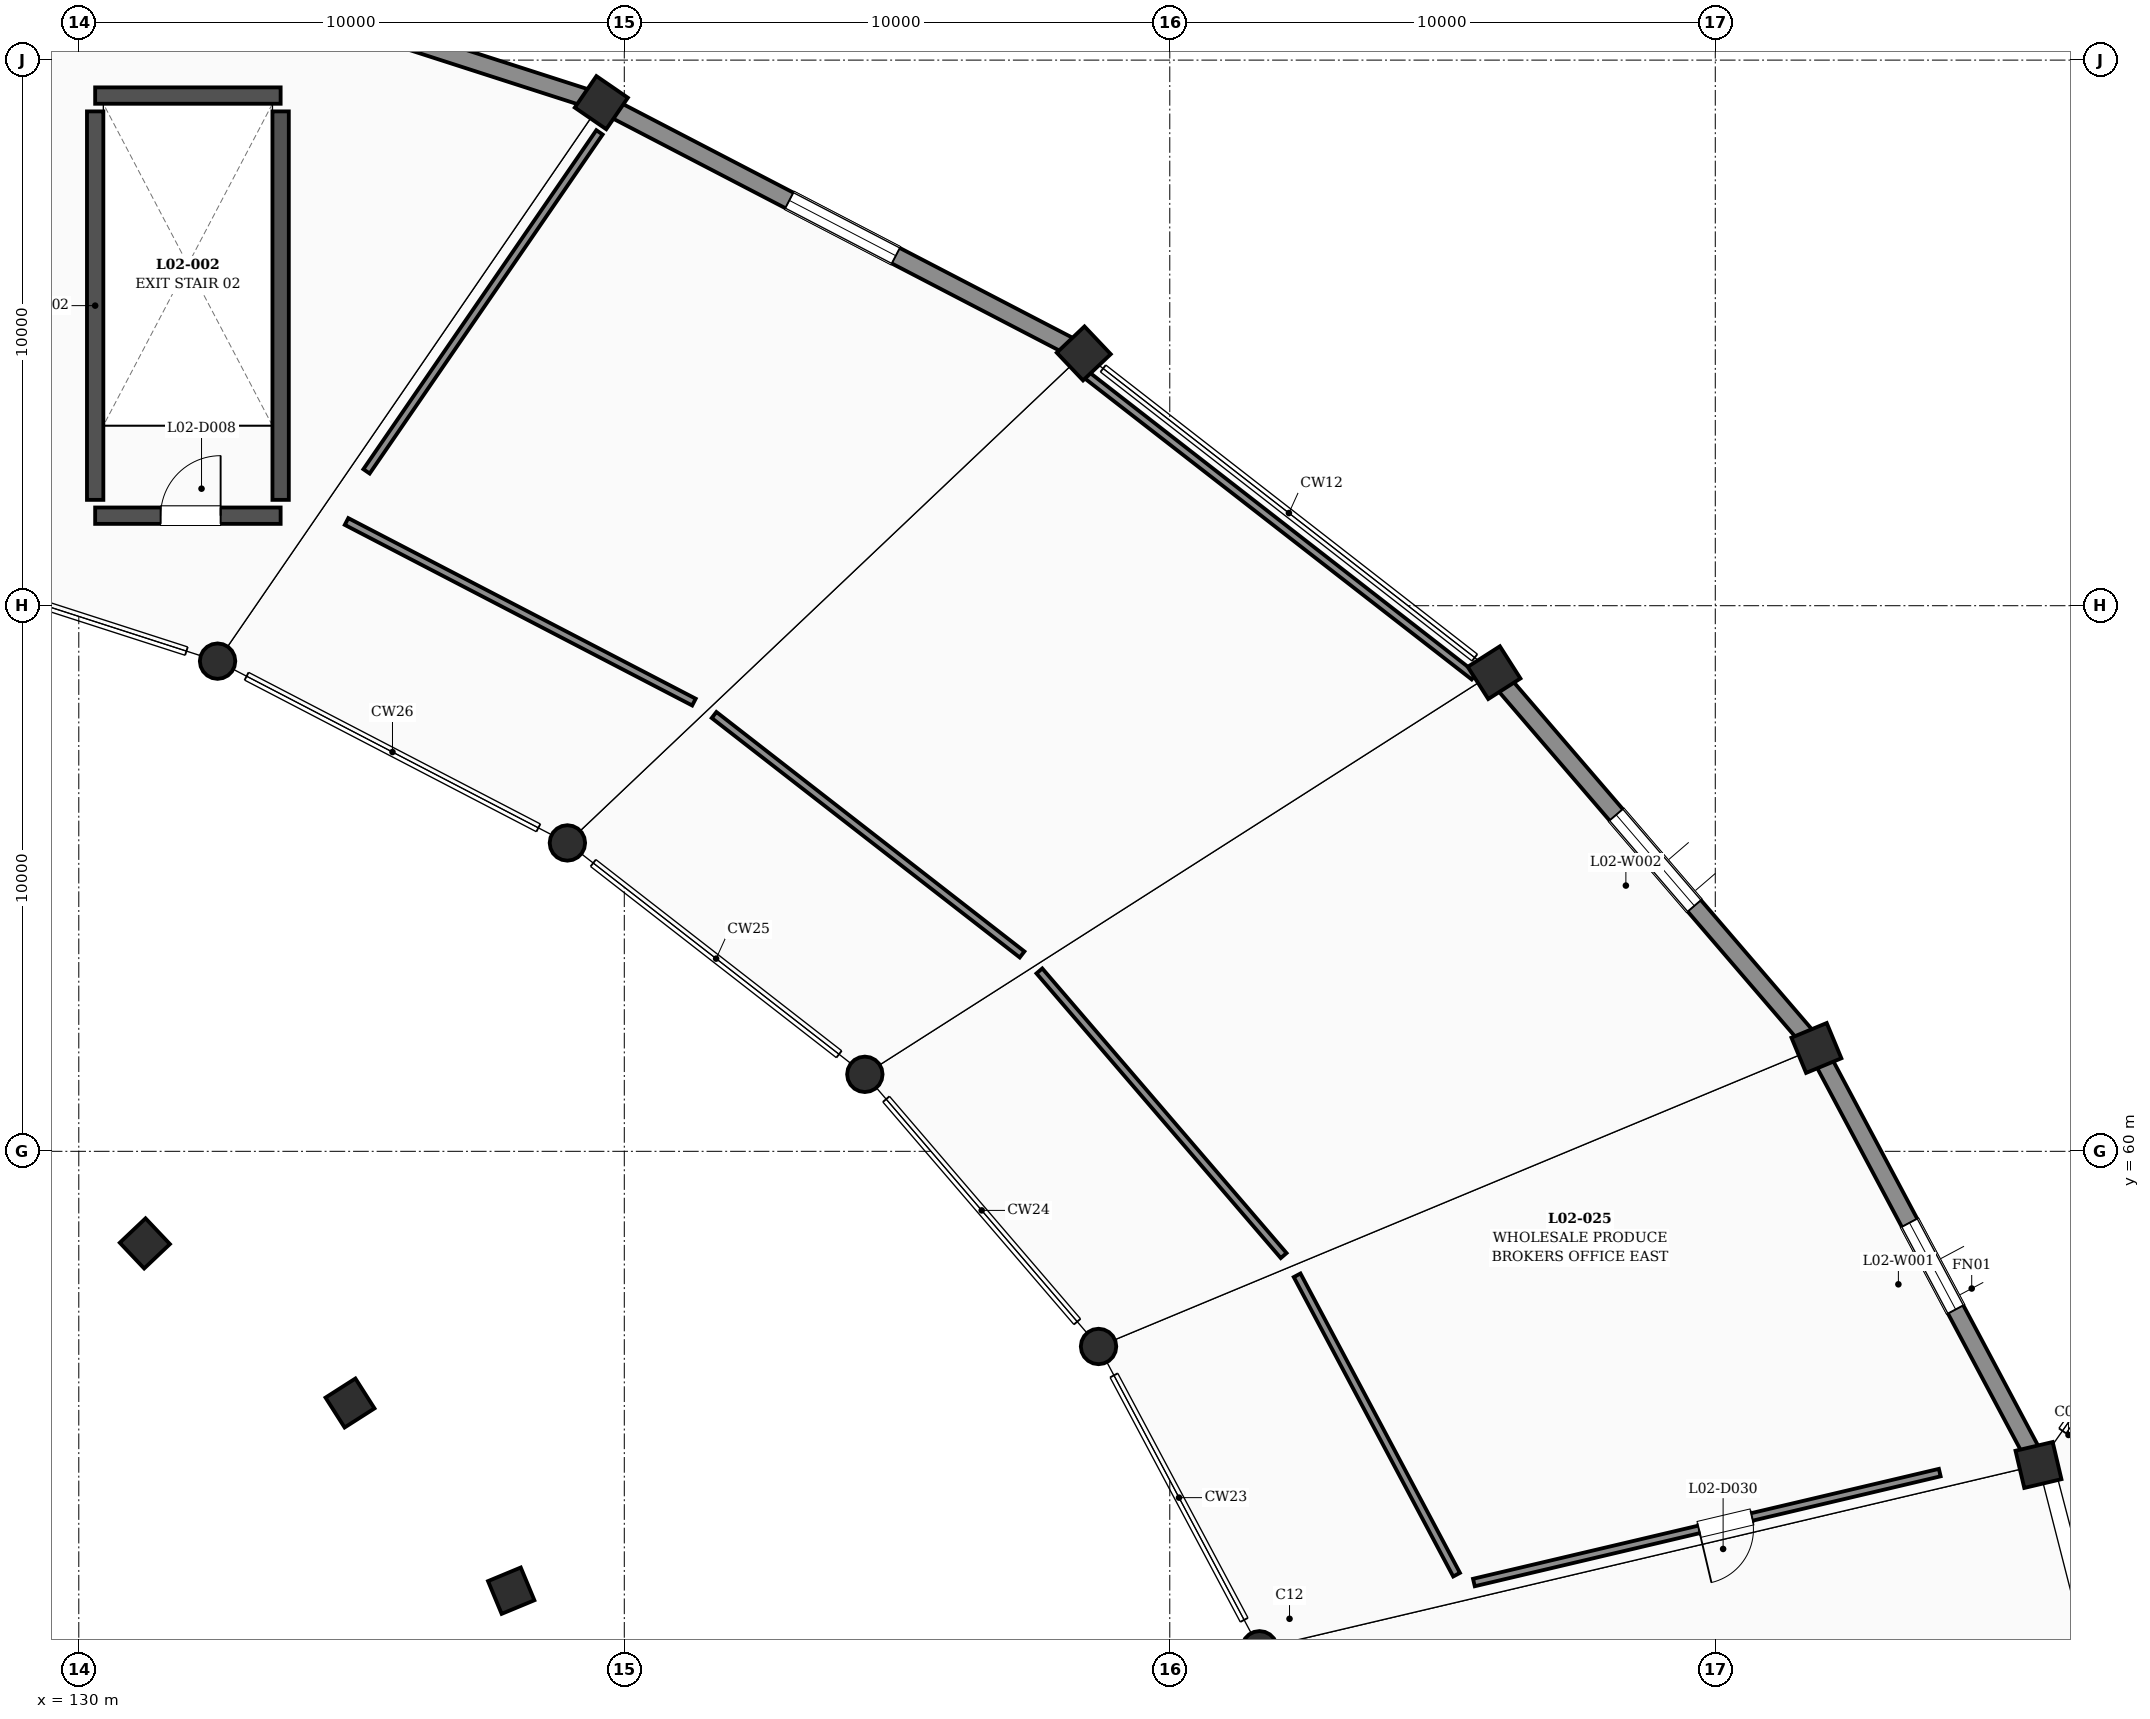
"""IFC4 building model, lengths in metres.
Left out: names, types, materials, properties, quantities, classifications, styles, units other than length and angle.
Written with IfcOpenShell. Run it as: python <this file> out.ifc"""

import sys

from ifc_helpers import new_model, si_unit, direction, frame, frame_2d, origin, origin_2d, place, context, subcontext, project, spatial, rectangle, circle, extrude, element, fill, save


model = new_model("IFC4")
c1 = context("Model", 3, precision=1e-05, world=origin(), true_north=direction((0.0, 1.0)))
c2 = subcontext(c1, "Body", "Model", "MODEL_VIEW")
j1 = project(units=[si_unit("LENGTHUNIT", "METRE"), si_unit("PLANEANGLEUNIT", "RADIAN")], contexts=[c1])
p1 = place(None, origin())
s1 = spatial("IfcSite", under=j1, at=p1, CompositionType="ELEMENT")
p2 = place(p1, origin())
s2 = spatial("IfcBuilding", under=s1, at=p2, CompositionType="ELEMENT")
p3 = place(p2, frame((0.0, 0.0, 10.8)))
s3 = spatial("IfcBuildingStorey", under=s2, at=p3, CompositionType="ELEMENT", Elevation=10.8)
p4 = place(p3, frame((165.925, 54.251, 0.0), z_axis=(0.0, 0.0, 1.0), x_axis=(-0.229710019669, 0.973259115993, 0.0)))
e1 = element("IfcColumn", 1, at=p4, inside=s3, PredefinedType="COLUMN", context=c2, shape_type="SweptSolid", body=[
    extrude(rectangle(XDim=0.7, YDim=0.7, at=origin_2d()), origin(), (0.0, 0.0, 1.0), 4.2),
])
p5 = place(p3, frame((151.645, 50.882, 0.0), z_axis=(0.0, 0.0, 1.0), x_axis=(1.0, 0.0, 0.0)))
e2 = element("IfcColumn", 2, at=p5, inside=s3, PredefinedType="COLUMN", context=c2, shape_type="SweptSolid", body=[
    extrude(circle(Radius=0.325, at=origin_2d()), origin(), (0.0, 0.0, 1.0), 4.2),
])
p6 = place(p3, frame((161.854, 61.894, 0.0), z_axis=(0.0, 0.0, 1.0), x_axis=(-0.383811878264, 0.923411307113, 0.0)))
e3 = element("IfcColumn", 3, at=p6, inside=s3, PredefinedType="COLUMN", context=c2, shape_type="SweptSolid", body=[
    extrude(rectangle(XDim=0.7, YDim=0.7, at=origin_2d()), origin(), (0.0, 0.0, 1.0), 4.2),
])
p7 = place(p3, frame((148.694, 56.423, 0.0), z_axis=(0.0, 0.0, 1.0), x_axis=(1.0, 0.0, 0.0)))
e4 = element("IfcColumn", 4, at=p7, inside=s3, PredefinedType="COLUMN", context=c2, shape_type="SweptSolid", body=[
    extrude(circle(Radius=0.325, at=origin_2d()), origin(), (0.0, 0.0, 1.0), 4.2),
])
p8 = place(p3, frame((137.927, 51.947, 0.0), z_axis=(0.0, 0.0, 1.0), x_axis=(-0.383811878264, 0.923411307113, 0.0)))
e5 = element("IfcColumn", 5, at=p8, inside=s3, PredefinedType="COLUMN", context=c2, shape_type="SweptSolid", body=[
    extrude(rectangle(XDim=0.65, YDim=0.65, at=origin_2d()), origin(), (0.0, 0.0, 1.0), 4.2),
])
p9 = place(p3, frame((155.945, 68.773, 0.0), z_axis=(0.0, 0.0, 1.0), x_axis=(-0.538035401546, 0.842922242371, 0.0)))
e6 = element("IfcColumn", 6, at=p9, inside=s3, PredefinedType="COLUMN", context=c2, shape_type="SweptSolid", body=[
    extrude(rectangle(XDim=0.7, YDim=0.7, at=origin_2d()), origin(), (0.0, 0.0, 1.0), 4.2),
])
p10 = place(p3, frame((144.41, 61.411, 0.0), z_axis=(0.0, 0.0, 1.0), x_axis=(1.0, 0.0, 0.0)))
e7 = element("IfcColumn", 7, at=p10, inside=s3, PredefinedType="COLUMN", context=c2, shape_type="SweptSolid", body=[
    extrude(circle(Radius=0.325, at=origin_2d()), origin(), (0.0, 0.0, 1.0), 4.2),
])
p11 = place(p3, frame((134.972, 55.387, 0.0), z_axis=(0.0, 0.0, 1.0), x_axis=(-0.538035401546, 0.842922242371, 0.0)))
e8 = element("IfcColumn", 8, at=p11, inside=s3, PredefinedType="COLUMN", context=c2, shape_type="SweptSolid", body=[
    extrude(rectangle(XDim=0.65, YDim=0.65, at=origin_2d()), origin(), (0.0, 0.0, 1.0), 4.2),
])
p12 = place(p3, frame((148.423, 74.624, 0.0), z_axis=(0.0, 0.0, 1.0), x_axis=(-0.687848001144, 0.725854756355, 0.0)))
e9 = element("IfcColumn", 9, at=p12, inside=s3, PredefinedType="COLUMN", context=c2, shape_type="SweptSolid", body=[
    extrude(rectangle(XDim=0.7, YDim=0.7, at=origin_2d()), origin(), (0.0, 0.0, 1.0), 4.2),
])
p13 = place(p3, frame((138.957, 65.652, 0.0), z_axis=(0.0, 0.0, 1.0), x_axis=(1.0, 0.0, 0.0)))
e10 = element("IfcColumn", 10, at=p13, inside=s3, PredefinedType="COLUMN", context=c2, shape_type="SweptSolid", body=[
    extrude(circle(Radius=0.325, at=origin_2d()), origin(), (0.0, 0.0, 1.0), 4.2),
])
p14 = place(p3, frame((131.211, 58.312, 0.0), z_axis=(0.0, 0.0, 1.0), x_axis=(-0.687848001144, 0.725854756355, 0.0)))
e11 = element("IfcColumn", 11, at=p14, inside=s3, PredefinedType="COLUMN", context=c2, shape_type="SweptSolid", body=[
    extrude(rectangle(XDim=0.65, YDim=0.65, at=origin_2d()), origin(), (0.0, 0.0, 1.0), 4.2),
])
p15 = place(p3, frame((139.579, 79.22, 0.0), z_axis=(0.0, 0.0, 1.0), x_axis=(-0.824126188622, 0.566406236925, 0.0)))
e12 = element("IfcColumn", 12, at=p15, inside=s3, PredefinedType="COLUMN", context=c2, shape_type="SweptSolid", body=[
    extrude(rectangle(XDim=0.7, YDim=0.7, at=origin_2d()), origin(), (0.0, 0.0, 1.0), 4.2),
])
p16 = place(p3, frame((132.544, 68.984, 0.0), z_axis=(0.0, 0.0, 1.0), x_axis=(1.0, 0.0, 0.0)))
e13 = element("IfcColumn", 13, at=p16, inside=s3, PredefinedType="COLUMN", context=c2, shape_type="SweptSolid", body=[
    extrude(circle(Radius=0.325, at=origin_2d()), origin(), (0.0, 0.0, 1.0), 4.2),
])
p17 = place(p3, frame((165.798, 54.489, 0.0), z_axis=(0.0, 0.0, 1.0), x_axis=(-0.47010905891, 0.882608334841, 0.0)))
e14 = element("IfcWall", 14, at=p17, inside=s3, PredefinedType="SOLIDWALL", context=c2, shape_type="SweptSolid", body=[
    extrude(rectangle(XDim=8.12, YDim=0.32, at=frame_2d((4.06, 0.0))), origin(), (0.0, 0.0, 1.0), 2.55),
])
p18 = place(p17, frame((2.96, 0.0, 0.55)))
e15 = element("IfcOpeningElement", 15, at=p18, cuts=e14, PredefinedType="OPENING", context=c2, shape_type="SweptSolid", body=[
    extrude(rectangle(XDim=1.8, YDim=1.8, at=frame_2d((0.9, 0.9))), frame((0.0, 0.17, 0.0), z_axis=(0.0, -1.0, 0.0), x_axis=(1.0, 0.0, 0.0)), (0.0, 0.0, 1.0), 0.34),
])
p19 = place(p3, frame((161.678, 62.099, 0.0), z_axis=(0.0, 0.0, 1.0), x_axis=(-0.651606697641, 0.758556992974, 0.0)))
e16 = element("IfcWall", 16, at=p19, inside=s3, PredefinedType="SOLIDWALL", context=c2, shape_type="SweptSolid", body=[
    extrude(rectangle(XDim=8.528, YDim=0.32, at=frame_2d((4.264, 0.0))), origin(), (0.0, 0.0, 1.0), 2.55),
])
p20 = place(p19, frame((3.164, 0.0, 0.55)))
e17 = element("IfcOpeningElement", 17, at=p20, cuts=e16, PredefinedType="OPENING", context=c2, shape_type="SweptSolid", body=[
    extrude(rectangle(XDim=2.2, YDim=1.8, at=frame_2d((1.1, 0.9))), frame((0.0, 0.17, 0.0), z_axis=(0.0, -1.0, 0.0), x_axis=(1.0, 0.0, 0.0)), (0.0, 0.0, 1.0), 0.34),
])
p21 = place(p3, frame((148.183, 74.749, 0.0), z_axis=(0.0, 0.0, 1.0), x_axis=(-0.887335924519, 0.461123581112, 0.0)))
e18 = element("IfcWall", 18, at=p21, inside=s3, PredefinedType="SOLIDWALL", context=c2, shape_type="SweptSolid", body=[
    extrude(rectangle(XDim=9.427, YDim=0.32, at=frame_2d((4.713, 0.0))), origin(), (0.0, 0.0, 1.0), 2.55),
])
p22 = place(p21, frame((3.613, 0.0, 0.55)))
e19 = element("IfcOpeningElement", 19, at=p22, cuts=e18, PredefinedType="OPENING", context=c2, shape_type="SweptSolid", body=[
    extrude(rectangle(XDim=2.2, YDim=1.8, at=frame_2d((1.1, 0.9))), frame((0.0, 0.17, 0.0), z_axis=(0.0, -1.0, 0.0), x_axis=(1.0, 0.0, 0.0)), (0.0, 0.0, 1.0), 0.34),
])
p23 = place(p3, frame((139.322, 79.303, 0.0), z_axis=(0.0, 0.0, 1.0), x_axis=(-0.95182847269, 0.30663098111, 0.0)))
e20 = element("IfcWall", 20, at=p23, inside=s3, PredefinedType="SOLIDWALL", context=c2, shape_type="SweptSolid", body=[
    extrude(rectangle(XDim=9.785, YDim=0.32, at=frame_2d((4.893, 0.0))), origin(), (0.0, 0.0, 1.0), 2.55),
])
p24 = place(p23, frame((3.793, 0.0, 0.55)))
e21 = element("IfcOpeningElement", 21, at=p24, cuts=e20, PredefinedType="OPENING", context=c2, shape_type="SweptSolid", body=[
    extrude(rectangle(XDim=1.8, YDim=1.8, at=frame_2d((0.9, 0.9))), frame((0.0, 0.17, 0.0), z_axis=(0.0, -1.0, 0.0), x_axis=(1.0, 0.0, 0.0)), (0.0, 0.0, 1.0), 0.34),
])
p25 = place(p3, frame((130.3, 71.65, 0.0), z_axis=(0.0, 0.0, 1.0), x_axis=(1.0, 0.0, 0.0)))
e22 = element("IfcWall", 22, at=p25, inside=s3, PredefinedType="SHEAR", context=c2, shape_type="SweptSolid", body=[
    extrude(rectangle(XDim=3.4, YDim=0.3, at=frame_2d((1.7, 0.0))), origin(), (0.0, 0.0, 1.0), 3.98),
])
p26 = place(p25, frame((1.2, 0.0, 0.0)))
e23 = element("IfcOpeningElement", 23, at=p26, cuts=e22, PredefinedType="OPENING", context=c2, shape_type="SweptSolid", body=[
    extrude(rectangle(XDim=1.1, YDim=2.2, at=frame_2d((0.55, 1.1))), frame((0.0, 0.16, 0.0), z_axis=(0.0, -1.0, 0.0), x_axis=(1.0, 0.0, 0.0)), (0.0, 0.0, 1.0), 0.32),
])
p27 = place(p3, frame((130.3, 79.35, 0.0), z_axis=(0.0, 0.0, 1.0), x_axis=(1.0, 0.0, 0.0)))
e24 = element("IfcWall", 24, at=p27, inside=s3, PredefinedType="SHEAR", context=c2, shape_type="SweptSolid", body=[
    extrude(rectangle(XDim=3.4, YDim=0.3, at=frame_2d((1.7, 0.0))), origin(), (0.0, 0.0, 1.0), 3.98),
])
for number, where, z_axis, x_axis in (
    (25, (130.3, 71.94, 0.0), (0.0, 0.0, 1.0), (0.0, 1.0, 0.0)),
    (26, (133.7, 71.94, 0.0), (0.0, 0.0, 1.0), (0.0, 1.0, 0.0)),
):
    element("IfcWall", number, at=place(p3, frame(where, z_axis=z_axis, x_axis=x_axis)), inside=s3, PredefinedType="SHEAR", context=c2, shape_type="SweptSolid", body=[
        extrude(rectangle(XDim=7.12, YDim=0.3, at=frame_2d((3.56, 0.0))), origin(), (0.0, 0.0, 1.0), 3.98),
    ])
p28 = place(p3, frame((152.088, 58.089, 0.0), z_axis=(0.0, 0.0, 1.0), x_axis=(-0.651320491165, 0.758802752887, 0.0)))
e27 = element("IfcWall", 27, at=p28, inside=s3, PredefinedType="PARTITIONING", context=c2, shape_type="SweptSolid", body=[
    extrude(rectangle(XDim=6.876, YDim=0.14, at=frame_2d((3.438, 0.0))), origin(), (0.0, 0.0, 1.0), 2.55),
])
p29 = place(p3, frame((147.292, 63.608, 0.0), z_axis=(0.0, 0.0, 1.0), x_axis=(-0.789524972824, 0.61371843486, 0.0)))
e28 = element("IfcWall", 28, at=p29, inside=s3, PredefinedType="PARTITIONING", context=c2, shape_type="SweptSolid", body=[
    extrude(rectangle(XDim=7.152, YDim=0.14, at=frame_2d((3.576, 0.0))), origin(), (0.0, 0.0, 1.0), 2.55),
])
p30 = place(p3, frame((141.277, 68.233, 0.0), z_axis=(0.0, 0.0, 1.0), x_axis=(-0.887310345139, 0.461172799946, 0.0)))
e29 = element("IfcWall", 29, at=p30, inside=s3, PredefinedType="PARTITIONING", context=c2, shape_type="SweptSolid", body=[
    extrude(rectangle(XDim=7.177, YDim=0.14, at=frame_2d((3.589, 0.0))), origin(), (0.0, 0.0, 1.0), 2.55),
])
p31 = place(p3, frame((135.275, 72.462, 0.0), z_axis=(0.0, 0.0, 1.0), x_axis=(0.566428499897, 0.824110887262, 0.0)))
e30 = element("IfcWall", 30, at=p31, inside=s3, PredefinedType="PARTITIONING", context=c2, shape_type="SweptSolid", body=[
    extrude(rectangle(XDim=7.54, YDim=0.14, at=frame_2d((3.77, 0.0))), origin(), (0.0, 0.0, 1.0), 2.55),
])
p32 = place(p3, frame((148.445, 74.252, 0.0), z_axis=(0.0, 0.0, 1.0), x_axis=(0.789346398164, -0.613948095286, 0.0)))
e31 = element("IfcWall", 31, at=p32, inside=s3, PredefinedType="PARTITIONING", context=c2, shape_type="SweptSolid", body=[
    extrude(rectangle(XDim=9.036, YDim=0.14, at=frame_2d((4.518, 0.0))), origin(), (0.0, 0.0, 1.0), 2.55),
])
p33 = place(p3, frame((164.115, 54.112, 0.0), z_axis=(0.0, 0.0, 1.0), x_axis=(-0.973273209665, -0.22965029795, 0.0)))
e32 = element("IfcWall", 32, at=p33, inside=s3, PredefinedType="PARTITIONING", context=c2, shape_type="SweptSolid", body=[
    extrude(rectangle(XDim=8.775, YDim=0.14, at=frame_2d((4.387, 0.0))), origin(), (0.0, 0.0, 1.0), 2.55),
])
p34 = place(p33, frame((3.537, 0.0, 0.0)))
e33 = element("IfcOpeningElement", 33, at=p34, cuts=e32, PredefinedType="OPENING", context=c2, shape_type="SweptSolid", body=[
    extrude(rectangle(XDim=1.0, YDim=2.2, at=frame_2d((0.5, 1.1))), frame((0.0, 0.08, 0.0), z_axis=(0.0, -1.0, 0.0), x_axis=(1.0, 0.0, 0.0)), (0.0, 0.0, 1.0), 0.16),
])
p35 = place(p3, frame((155.258, 52.24, 0.0), z_axis=(0.0, 0.0, 1.0), x_axis=(-0.470137764168, 0.882593044785, 0.0)))
e34 = element("IfcWall", 34, at=p35, inside=s3, PredefinedType="PARTITIONING", context=c2, shape_type="SweptSolid", body=[
    extrude(rectangle(XDim=6.218, YDim=0.14, at=frame_2d((3.109, 0.0))), origin(), (0.0, 0.0, 1.0), 2.55),
])
p36 = place(p18, origin())
e35 = element("IfcWindow", 35, at=p36, inside=s3, PartitioningType="SINGLE_PANEL", PredefinedType="WINDOW", context=c2, shape_type="SweptSolid", body=[
    extrude(rectangle(XDim=1.8, YDim=1.8, at=frame_2d((0.9, 0.9))), frame((0.0, 0.03, 0.0), z_axis=(0.0, -1.0, 0.0), x_axis=(1.0, 0.0, 0.0)), (0.0, 0.0, 1.0), 0.06),
])
fill(e15, e35)
p37 = place(p20, origin())
e36 = element("IfcWindow", 36, at=p37, inside=s3, PartitioningType="SINGLE_PANEL", PredefinedType="WINDOW", context=c2, shape_type="SweptSolid", body=[
    extrude(rectangle(XDim=2.2, YDim=1.8, at=frame_2d((1.1, 0.9))), frame((0.0, 0.03, 0.0), z_axis=(0.0, -1.0, 0.0), x_axis=(1.0, 0.0, 0.0)), (0.0, 0.0, 1.0), 0.06),
])
fill(e17, e36)
p38 = place(p22, origin())
e37 = element("IfcWindow", 37, at=p38, inside=s3, PartitioningType="SINGLE_PANEL", PredefinedType="WINDOW", context=c2, shape_type="SweptSolid", body=[
    extrude(rectangle(XDim=2.2, YDim=1.8, at=frame_2d((1.1, 0.9))), frame((0.0, 0.03, 0.0), z_axis=(0.0, -1.0, 0.0), x_axis=(1.0, 0.0, 0.0)), (0.0, 0.0, 1.0), 0.06),
])
fill(e19, e37)
p39 = place(p26, origin())
e38 = element("IfcDoor", 38, at=p39, inside=s3, OperationType="SINGLE_SWING_RIGHT", PredefinedType="DOOR", context=c2, shape_type="SweptSolid", body=[
    extrude(rectangle(XDim=1.1, YDim=2.2, at=frame_2d((0.55, 1.1))), frame((0.0, 0.025, 0.0), z_axis=(0.0, -1.0, 0.0), x_axis=(1.0, 0.0, 0.0)), (0.0, 0.0, 1.0), 0.05),
])
fill(e23, e38)
p40 = place(p34, origin())
e39 = element("IfcDoor", 39, at=p40, inside=s3, OperationType="SINGLE_SWING_RIGHT", PredefinedType="DOOR", context=c2, shape_type="SweptSolid", body=[
    extrude(rectangle(XDim=1.0, YDim=2.2, at=frame_2d((0.5, 1.1))), frame((0.0, 0.025, 0.0), z_axis=(0.0, -1.0, 0.0), x_axis=(1.0, 0.0, 0.0)), (0.0, 0.0, 1.0), 0.05),
])
fill(e33, e39)
save(model, sys.argv[1])
